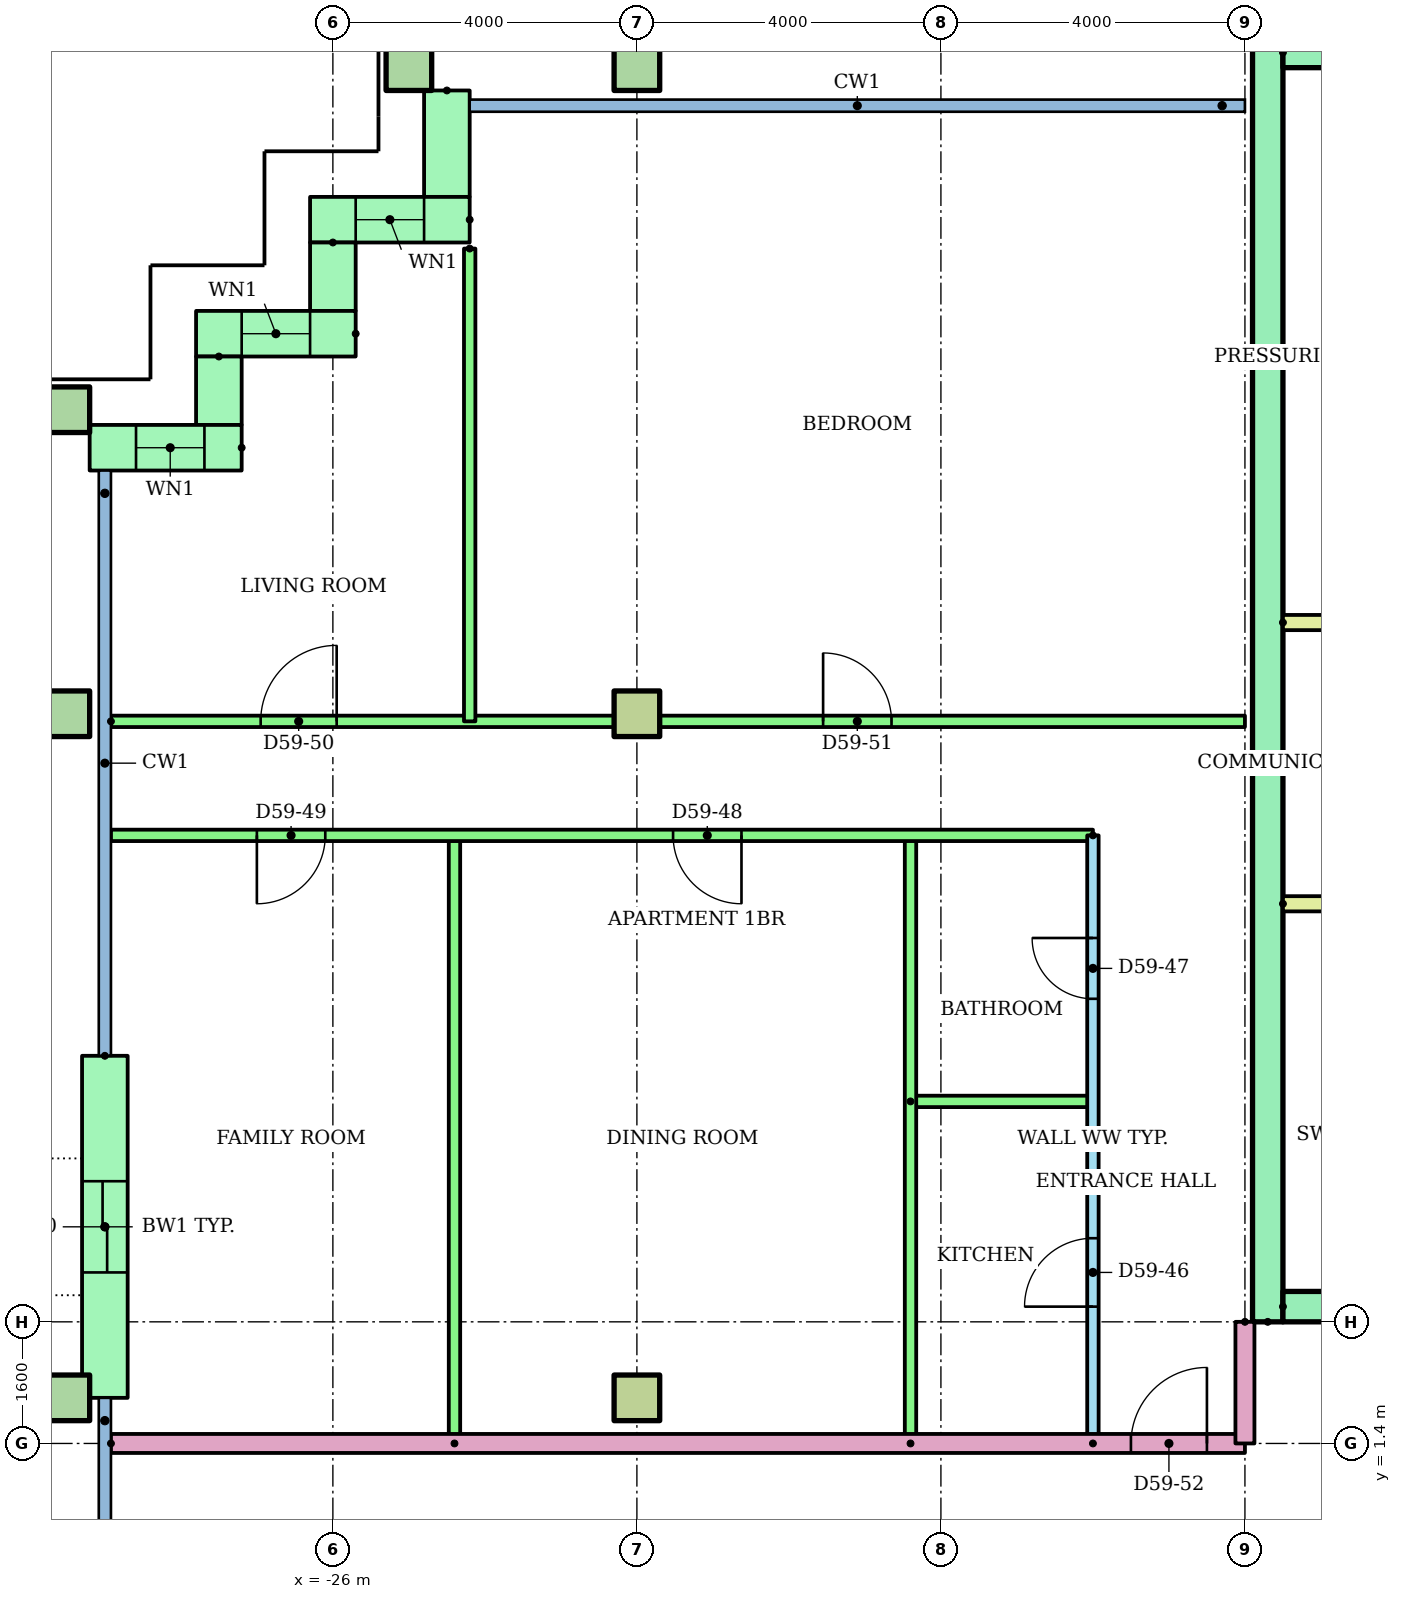
"""IFC4 building model, lengths in metres.
Left out: names, types, materials, properties, quantities, classifications, styles, units other than length and angle.
Written with IfcOpenShell. Run it as: python <this file> out.ifc"""

import sys

from ifc_helpers import new_model, si_unit, direction, frame, frame_2d, origin, origin_2d, place, context, subcontext, project, spatial, rectangle, hollow_rectangle, extrude, element, fill, save


model = new_model("IFC4")
c1 = context("Model", 3, precision=1e-05, world=origin(), true_north=direction((0.0, 1.0)))
c2 = subcontext(c1, "Body", "Model", "MODEL_VIEW")
j1 = project(units=[si_unit("LENGTHUNIT", "METRE"), si_unit("PLANEANGLEUNIT", "RADIAN")], contexts=[c1])
p1 = place(None, origin())
s1 = spatial("IfcSite", under=j1, at=p1, CompositionType="ELEMENT")
p2 = place(p1, origin())
s2 = spatial("IfcBuilding", under=s1, at=p2, CompositionType="ELEMENT")
p3 = place(p2, frame((0.0, 0.0, 226.8)))
s3 = spatial("IfcBuildingStorey", under=s2, at=p3, CompositionType="ELEMENT", Elevation=226.8)
p4 = place(p3, frame((-29.5, 2.0, 0.0)))
e1 = element("IfcColumn", 1, at=p4, inside=s3, PredefinedType="COLUMN", context=c2, shape_type="SweptSolid", body=[
    extrude(hollow_rectangle(XDim=0.6, YDim=0.6, WallThickness=0.03, at=origin_2d()), origin(), (0.0, 0.0, 1.0), 3.2),
])
p5 = place(p3, frame((-22.0, 2.0, 0.0)))
e2 = element("IfcColumn", 2, at=p5, inside=s3, PredefinedType="COLUMN", context=c2, shape_type="SweptSolid", body=[
    extrude(rectangle(XDim=0.6, YDim=0.6, at=origin_2d()), origin(), (0.0, 0.0, 1.0), 3.2),
])
p6 = place(p3, frame((-29.5, 11.0, 0.0)))
e3 = element("IfcColumn", 3, at=p6, inside=s3, PredefinedType="COLUMN", context=c2, shape_type="SweptSolid", body=[
    extrude(hollow_rectangle(XDim=0.6, YDim=0.6, WallThickness=0.03, at=origin_2d()), origin(), (0.0, 0.0, 1.0), 3.2),
])
p7 = place(p3, frame((-22.0, 11.0, 0.0)))
e4 = element("IfcColumn", 4, at=p7, inside=s3, PredefinedType="COLUMN", context=c2, shape_type="SweptSolid", body=[
    extrude(rectangle(XDim=0.6, YDim=0.6, at=origin_2d()), origin(), (0.0, 0.0, 1.0), 3.2),
])
for number, where in (
    (5, (-29.5, 15.0, 0.0)),
    (6, (-25.0, 19.5, 0.0)),
    (7, (-22.0, 19.5, 0.0)),
):
    element("IfcColumn", number, at=place(p3, frame(where)), inside=s3, PredefinedType="COLUMN", context=c2, shape_type="SweptSolid", body=[
        extrude(hollow_rectangle(XDim=0.6, YDim=0.6, WallThickness=0.03, at=origin_2d()), origin(), (0.0, 0.0, 1.0), 3.2),
    ])
p8 = place(p3, frame((-24.5, 19.2, 0.0), z_axis=(0.0, 0.0, 1.0), x_axis=(0.0, -1.0, 0.0)))
e8 = element("IfcWall", 8, at=p8, inside=s3, PredefinedType="STANDARD", context=c2, shape_type="SweptSolid", body=[
    extrude(rectangle(XDim=1.4, YDim=0.6, at=frame_2d((0.7, 0.0))), origin(), (0.0, 0.0, 1.0), 2.92),
])
p9 = place(p3, frame((-24.2, 17.5, 0.0), z_axis=(0.0, 0.0, 1.0), x_axis=(-1.0, 0.0, 0.0)))
e9 = element("IfcWall", 9, at=p9, inside=s3, PredefinedType="STANDARD", context=c2, shape_type="SweptSolid", body=[
    extrude(rectangle(XDim=2.1, YDim=0.6, at=frame_2d((1.05, 0.0))), origin(), (0.0, 0.0, 1.0), 2.92),
])
p10 = place(p9, frame((0.6, 0.0, 0.9)))
e10 = element("IfcOpeningElement", 10, at=p10, cuts=e9, PredefinedType="OPENING", context=c2, shape_type="SweptSolid", body=[
    extrude(rectangle(XDim=0.9, YDim=1.5, at=frame_2d((0.45, 0.75))), frame((0.0, 0.31, 0.0), z_axis=(0.0, -1.0, 0.0), x_axis=(1.0, 0.0, 0.0)), (0.0, 0.0, 1.0), 0.62),
])
p11 = place(p3, frame((-26.0, 17.2, 0.0), z_axis=(0.0, 0.0, 1.0), x_axis=(0.0, -1.0, 0.0)))
e11 = element("IfcWall", 11, at=p11, inside=s3, PredefinedType="STANDARD", context=c2, shape_type="SweptSolid", body=[
    extrude(rectangle(XDim=0.9, YDim=0.6, at=frame_2d((0.45, 0.0))), origin(), (0.0, 0.0, 1.0), 2.92),
])
p12 = place(p3, frame((-25.7, 16.0, 0.0), z_axis=(0.0, 0.0, 1.0), x_axis=(-1.0, 0.0, 0.0)))
e12 = element("IfcWall", 12, at=p12, inside=s3, PredefinedType="STANDARD", context=c2, shape_type="SweptSolid", body=[
    extrude(rectangle(XDim=2.1, YDim=0.6, at=frame_2d((1.05, 0.0))), origin(), (0.0, 0.0, 1.0), 2.92),
])
p13 = place(p12, frame((0.6, 0.0, 0.9)))
e13 = element("IfcOpeningElement", 13, at=p13, cuts=e12, PredefinedType="OPENING", context=c2, shape_type="SweptSolid", body=[
    extrude(rectangle(XDim=0.9, YDim=1.5, at=frame_2d((0.45, 0.75))), frame((0.0, 0.31, 0.0), z_axis=(0.0, -1.0, 0.0), x_axis=(1.0, 0.0, 0.0)), (0.0, 0.0, 1.0), 0.62),
])
p14 = place(p3, frame((-27.5, 15.7, 0.0), z_axis=(0.0, 0.0, 1.0), x_axis=(0.0, -1.0, 0.0)))
e14 = element("IfcWall", 14, at=p14, inside=s3, PredefinedType="STANDARD", context=c2, shape_type="SweptSolid", body=[
    extrude(rectangle(XDim=0.9, YDim=0.6, at=frame_2d((0.45, 0.0))), origin(), (0.0, 0.0, 1.0), 2.92),
])
p15 = place(p3, frame((-27.2, 14.5, 0.0), z_axis=(0.0, 0.0, 1.0), x_axis=(-1.0, 0.0, 0.0)))
e15 = element("IfcWall", 15, at=p15, inside=s3, PredefinedType="STANDARD", context=c2, shape_type="SweptSolid", body=[
    extrude(rectangle(XDim=2.0, YDim=0.6, at=frame_2d((1.0, 0.0))), origin(), (0.0, 0.0, 1.0), 2.92),
])
p16 = place(p15, frame((0.49, 0.0, 0.9)))
e16 = element("IfcOpeningElement", 16, at=p16, cuts=e15, PredefinedType="OPENING", context=c2, shape_type="SweptSolid", body=[
    extrude(rectangle(XDim=0.9, YDim=1.5, at=frame_2d((0.45, 0.75))), frame((0.0, 0.31, 0.0), z_axis=(0.0, -1.0, 0.0), x_axis=(1.0, 0.0, 0.0)), (0.0, 0.0, 1.0), 0.62),
])
p17 = place(p3, frame((-29.0, 6.5, 0.0), z_axis=(0.0, 0.0, 1.0), x_axis=(0.0, -1.0, 0.0)))
e17 = element("IfcWall", 17, at=p17, inside=s3, PredefinedType="STANDARD", context=c2, shape_type="SweptSolid", body=[
    extrude(rectangle(XDim=4.5, YDim=0.6, at=frame_2d((2.25, 0.0))), origin(), (0.0, 0.0, 1.0), 2.92),
])
p18 = place(p17, frame((1.65, 0.0, 0.0)))
e18 = element("IfcOpeningElement", 18, at=p18, cuts=e17, PredefinedType="OPENING", context=c2, shape_type="SweptSolid", body=[
    extrude(rectangle(XDim=1.2, YDim=2.1, at=frame_2d((0.6, 1.05))), frame((0.0, 0.31, 0.0), z_axis=(0.0, -1.0, 0.0), x_axis=(1.0, 0.0, 0.0)), (0.0, 0.0, 1.0), 0.62),
])
p19 = place(p3, frame((-13.7, 3.0, 0.0), z_axis=(0.0, 0.0, 1.0), x_axis=(0.0, 1.0, 0.0)))
e19 = element("IfcWall", 19, at=p19, inside=s3, PredefinedType="SHEAR", context=c2, shape_type="SweptSolid", body=[
    extrude(rectangle(XDim=17.0, YDim=0.4, at=frame_2d((8.5, 0.0))), origin(), (0.0, 0.0, 1.0), 2.92),
])
p20 = place(p3, frame((-13.5, 19.7, 0.0)))
e20 = element("IfcWall", 20, at=p20, inside=s3, PredefinedType="SHEAR", context=c2, shape_type="SweptSolid", body=[
    extrude(rectangle(XDim=27.0, YDim=0.4, at=frame_2d((13.5, 0.0))), origin(), (0.0, 0.0, 1.0), 2.92),
])
p21 = place(p3, frame((-13.5, 3.2, 0.0)))
e21 = element("IfcWall", 21, at=p21, inside=s3, PredefinedType="SHEAR", context=c2, shape_type="SweptSolid", body=[
    extrude(rectangle(XDim=27.0, YDim=0.4, at=frame_2d((13.5, 0.0))), origin(), (0.0, 0.0, 1.0), 2.92),
])
p22 = place(p21, frame((22.083, 0.0, 0.0)))
e22 = element("IfcOpeningElement", 22, at=p22, cuts=e21, PredefinedType="OPENING", context=c2, shape_type="SweptSolid", body=[
    extrude(rectangle(XDim=1.1, YDim=2.1, at=frame_2d((0.55, 1.05))), frame((0.0, 0.21, 0.0), z_axis=(0.0, -1.0, 0.0), x_axis=(1.0, 0.0, 0.0)), (0.0, 0.0, 1.0), 0.42),
])
p23 = place(p21, frame((25.128, 0.0, 0.0)))
e23 = element("IfcOpeningElement", 23, at=p23, cuts=e21, PredefinedType="OPENING", context=c2, shape_type="SweptSolid", body=[
    extrude(rectangle(XDim=1.1, YDim=2.1, at=frame_2d((0.55, 1.05))), frame((0.0, 0.21, 0.0), z_axis=(0.0, -1.0, 0.0), x_axis=(1.0, 0.0, 0.0)), (0.0, 0.0, 1.0), 0.42),
])
p24 = place(p21, frame((12.6, 0.0, 0.0)))
e24 = element("IfcOpeningElement", 24, at=p24, cuts=e21, PredefinedType="OPENING", context=c2, shape_type="SweptSolid", body=[
    extrude(rectangle(XDim=1.8, YDim=2.1, at=frame_2d((0.9, 1.05))), frame((0.0, 0.21, 0.0), z_axis=(0.0, -1.0, 0.0), x_axis=(1.0, 0.0, 0.0)), (0.0, 0.0, 1.0), 0.42),
])
for number, where in (
    (25, (-13.5, 8.5, 0.0)),
    (26, (-13.5, 12.2, 0.0)),
):
    element("IfcWall", number, at=place(p3, frame(where)), inside=s3, PredefinedType="PARTITIONING", context=c2, shape_type="SweptSolid", body=[
        extrude(rectangle(XDim=3.9, YDim=0.2, at=frame_2d((1.95, 0.0))), origin(), (0.0, 0.0, 1.0), 2.92),
    ])
p25 = place(p3, frame((-16.0, 1.4, 0.0), z_axis=(0.0, 0.0, 1.0), x_axis=(0.0, 1.0, 0.0)))
e27 = element("IfcWall", 27, at=p25, inside=s3, PredefinedType="PARTITIONING", context=c2, shape_type="SweptSolid", body=[
    extrude(rectangle(XDim=8.0, YDim=0.15, at=frame_2d((4.0, 0.0))), origin(), (0.0, 0.0, 1.0), 2.4),
])
p26 = place(p25, frame((1.8, 0.0, 0.0)))
e28 = element("IfcOpeningElement", 28, at=p26, cuts=e27, PredefinedType="OPENING", context=c2, shape_type="SweptSolid", body=[
    extrude(rectangle(XDim=0.9, YDim=2.1, at=frame_2d((0.45, 1.05))), frame((0.0, 0.085, 0.0), z_axis=(0.0, -1.0, 0.0), x_axis=(1.0, 0.0, 0.0)), (0.0, 0.0, 1.0), 0.17),
])
p27 = place(p25, frame((5.85, 0.0, 0.0)))
e29 = element("IfcOpeningElement", 29, at=p27, cuts=e27, PredefinedType="OPENING", context=c2, shape_type="SweptSolid", body=[
    extrude(rectangle(XDim=0.8, YDim=2.1, at=frame_2d((0.4, 1.05))), frame((0.0, 0.085, 0.0), z_axis=(0.0, -1.0, 0.0), x_axis=(1.0, 0.0, 0.0)), (0.0, 0.0, 1.0), 0.17),
])
p28 = place(p3, frame((-18.4, 5.9, 0.0)))
e30 = element("IfcWall", 30, at=p28, inside=s3, PredefinedType="PARTITIONING", context=c2, shape_type="SweptSolid", body=[
    extrude(rectangle(XDim=2.4, YDim=0.15, at=frame_2d((1.2, 0.0))), origin(), (0.0, 0.0, 1.0), 2.4),
])
for number, where, z_axis, x_axis in (
    (31, (-18.4, 1.4, 0.0), (0.0, 0.0, 1.0), (0.0, 1.0, 0.0)),
    (32, (-24.4, 1.4, 0.0), (0.0, 0.0, 1.0), (0.0, 1.0, 0.0)),
):
    element("IfcWall", number, at=place(p3, frame(where, z_axis=z_axis, x_axis=x_axis)), inside=s3, PredefinedType="PARTITIONING", context=c2, shape_type="SweptSolid", body=[
        extrude(rectangle(XDim=8.0, YDim=0.15, at=frame_2d((4.0, 0.0))), origin(), (0.0, 0.0, 1.0), 2.4),
    ])
p29 = place(p3, frame((-16.0, 9.4, 0.0), z_axis=(0.0, 0.0, 1.0), x_axis=(-1.0, 0.0, 0.0)))
e33 = element("IfcWall", 33, at=p29, inside=s3, PredefinedType="PARTITIONING", context=c2, shape_type="SweptSolid", body=[
    extrude(rectangle(XDim=12.92, YDim=0.15, at=frame_2d((6.46, 0.0))), origin(), (0.0, 0.0, 1.0), 2.4),
])
p30 = place(p29, frame((4.624, 0.0, 0.0)))
e34 = element("IfcOpeningElement", 34, at=p30, cuts=e33, PredefinedType="OPENING", context=c2, shape_type="SweptSolid", body=[
    extrude(rectangle(XDim=0.9, YDim=2.1, at=frame_2d((0.45, 1.05))), frame((0.0, 0.085, 0.0), z_axis=(0.0, -1.0, 0.0), x_axis=(1.0, 0.0, 0.0)), (0.0, 0.0, 1.0), 0.17),
])
p31 = place(p29, frame((10.1, 0.0, 0.0)))
e35 = element("IfcOpeningElement", 35, at=p31, cuts=e33, PredefinedType="OPENING", context=c2, shape_type="SweptSolid", body=[
    extrude(rectangle(XDim=0.9, YDim=2.1, at=frame_2d((0.45, 1.05))), frame((0.0, 0.085, 0.0), z_axis=(0.0, -1.0, 0.0), x_axis=(1.0, 0.0, 0.0)), (0.0, 0.0, 1.0), 0.17),
])
p32 = place(p3, frame((-28.92, 10.9, 0.0)))
e36 = element("IfcWall", 36, at=p32, inside=s3, PredefinedType="PARTITIONING", context=c2, shape_type="SweptSolid", body=[
    extrude(rectangle(XDim=14.92, YDim=0.15, at=frame_2d((7.46, 0.0))), origin(), (0.0, 0.0, 1.0), 2.4),
])
p33 = place(p32, frame((1.97, 0.0, 0.0)))
e37 = element("IfcOpeningElement", 37, at=p33, cuts=e36, PredefinedType="OPENING", context=c2, shape_type="SweptSolid", body=[
    extrude(rectangle(XDim=1.0, YDim=2.1, at=frame_2d((0.5, 1.05))), frame((0.0, 0.085, 0.0), z_axis=(0.0, -1.0, 0.0), x_axis=(1.0, 0.0, 0.0)), (0.0, 0.0, 1.0), 0.17),
])
p34 = place(p32, frame((9.37, 0.0, 0.0)))
e38 = element("IfcOpeningElement", 38, at=p34, cuts=e36, PredefinedType="OPENING", context=c2, shape_type="SweptSolid", body=[
    extrude(rectangle(XDim=0.9, YDim=2.1, at=frame_2d((0.45, 1.05))), frame((0.0, 0.085, 0.0), z_axis=(0.0, -1.0, 0.0), x_axis=(1.0, 0.0, 0.0)), (0.0, 0.0, 1.0), 0.17),
])
p35 = place(p3, frame((-24.2, 17.12, 0.0), z_axis=(0.0, 0.0, 1.0), x_axis=(0.0, -1.0, 0.0)))
e39 = element("IfcWall", 39, at=p35, inside=s3, PredefinedType="PARTITIONING", context=c2, shape_type="SweptSolid", body=[
    extrude(rectangle(XDim=6.22, YDim=0.15, at=frame_2d((3.11, 0.0))), origin(), (0.0, 0.0, 1.0), 2.4),
])
p36 = place(p3, frame((-28.92, 1.4, 0.0)))
e40 = element("IfcWall", 40, at=p36, inside=s3, PredefinedType="PARTITIONING", context=c2, shape_type="SweptSolid", body=[
    extrude(rectangle(XDim=14.92, YDim=0.25, at=frame_2d((7.46, 0.0))), origin(), (0.0, 0.0, 1.0), 2.4),
])
p37 = place(p36, frame((13.42, 0.0, 0.0)))
e41 = element("IfcOpeningElement", 41, at=p37, cuts=e40, PredefinedType="OPENING", context=c2, shape_type="SweptSolid", body=[
    extrude(rectangle(XDim=1.0, YDim=2.1, at=frame_2d((0.5, 1.05))), frame((0.0, 0.135, 0.0), z_axis=(0.0, -1.0, 0.0), x_axis=(1.0, 0.0, 0.0)), (0.0, 0.0, 1.0), 0.27),
])
p38 = place(p3, frame((-14.0, 3.0, 0.0), z_axis=(0.0, 0.0, 1.0), x_axis=(0.0, -1.0, 0.0)))
e42 = element("IfcWall", 42, at=p38, inside=s3, PredefinedType="PARTITIONING", context=c2, shape_type="SweptSolid", body=[
    extrude(rectangle(XDim=1.6, YDim=0.25, at=frame_2d((0.8, 0.0))), origin(), (0.0, 0.0, 1.0), 2.4),
])
p39 = place(p10, origin())
e43 = element("IfcWindow", 43, at=p39, inside=s3, PartitioningType="SINGLE_PANEL", PredefinedType="WINDOW", context=c2, shape_type="SweptSolid", body=[
    extrude(rectangle(XDim=0.9, YDim=1.5, at=frame_2d((0.45, 0.75))), frame((0.0, 0.03, 0.0), z_axis=(0.0, -1.0, 0.0), x_axis=(1.0, 0.0, 0.0)), (0.0, 0.0, 1.0), 0.06),
])
fill(e10, e43)
p40 = place(p13, origin())
e44 = element("IfcWindow", 44, at=p40, inside=s3, PartitioningType="SINGLE_PANEL", PredefinedType="WINDOW", context=c2, shape_type="SweptSolid", body=[
    extrude(rectangle(XDim=0.9, YDim=1.5, at=frame_2d((0.45, 0.75))), frame((0.0, 0.03, 0.0), z_axis=(0.0, -1.0, 0.0), x_axis=(1.0, 0.0, 0.0)), (0.0, 0.0, 1.0), 0.06),
])
fill(e13, e44)
p41 = place(p16, origin())
e45 = element("IfcWindow", 45, at=p41, inside=s3, PartitioningType="SINGLE_PANEL", PredefinedType="WINDOW", context=c2, shape_type="SweptSolid", body=[
    extrude(rectangle(XDim=0.9, YDim=1.5, at=frame_2d((0.45, 0.75))), frame((0.0, 0.03, 0.0), z_axis=(0.0, -1.0, 0.0), x_axis=(1.0, 0.0, 0.0)), (0.0, 0.0, 1.0), 0.06),
])
fill(e16, e45)
p42 = place(p26, origin())
e46 = element("IfcDoor", 46, at=p42, inside=s3, OperationType="SINGLE_SWING_LEFT", PredefinedType="DOOR", context=c2, shape_type="SweptSolid", body=[
    extrude(rectangle(XDim=0.9, YDim=2.1, at=frame_2d((0.45, 1.05))), frame((0.0, 0.025, 0.0), z_axis=(0.0, -1.0, 0.0), x_axis=(1.0, 0.0, 0.0)), (0.0, 0.0, 1.0), 0.05),
])
fill(e28, e46)
p43 = place(p27, origin())
e47 = element("IfcDoor", 47, at=p43, inside=s3, OperationType="SINGLE_SWING_RIGHT", PredefinedType="DOOR", context=c2, shape_type="SweptSolid", body=[
    extrude(rectangle(XDim=0.8, YDim=2.1, at=frame_2d((0.4, 1.05))), frame((0.0, 0.025, 0.0), z_axis=(0.0, -1.0, 0.0), x_axis=(1.0, 0.0, 0.0)), (0.0, 0.0, 1.0), 0.05),
])
fill(e29, e47)
p44 = place(p30, origin())
e48 = element("IfcDoor", 48, at=p44, inside=s3, OperationType="SINGLE_SWING_LEFT", PredefinedType="DOOR", context=c2, shape_type="SweptSolid", body=[
    extrude(rectangle(XDim=0.9, YDim=2.1, at=frame_2d((0.45, 1.05))), frame((0.0, 0.025, 0.0), z_axis=(0.0, -1.0, 0.0), x_axis=(1.0, 0.0, 0.0)), (0.0, 0.0, 1.0), 0.05),
])
fill(e34, e48)
p45 = place(p31, origin())
e49 = element("IfcDoor", 49, at=p45, inside=s3, OperationType="SINGLE_SWING_RIGHT", PredefinedType="DOOR", context=c2, shape_type="SweptSolid", body=[
    extrude(rectangle(XDim=0.9, YDim=2.1, at=frame_2d((0.45, 1.05))), frame((0.0, 0.025, 0.0), z_axis=(0.0, -1.0, 0.0), x_axis=(1.0, 0.0, 0.0)), (0.0, 0.0, 1.0), 0.05),
])
fill(e35, e49)
p46 = place(p33, origin())
e50 = element("IfcDoor", 50, at=p46, inside=s3, OperationType="SINGLE_SWING_RIGHT", PredefinedType="DOOR", context=c2, shape_type="SweptSolid", body=[
    extrude(rectangle(XDim=1.0, YDim=2.1, at=frame_2d((0.5, 1.05))), frame((0.0, 0.025, 0.0), z_axis=(0.0, -1.0, 0.0), x_axis=(1.0, 0.0, 0.0)), (0.0, 0.0, 1.0), 0.05),
])
fill(e37, e50)
p47 = place(p34, origin())
e51 = element("IfcDoor", 51, at=p47, inside=s3, OperationType="SINGLE_SWING_LEFT", PredefinedType="DOOR", context=c2, shape_type="SweptSolid", body=[
    extrude(rectangle(XDim=0.9, YDim=2.1, at=frame_2d((0.45, 1.05))), frame((0.0, 0.025, 0.0), z_axis=(0.0, -1.0, 0.0), x_axis=(1.0, 0.0, 0.0)), (0.0, 0.0, 1.0), 0.05),
])
fill(e38, e51)
p48 = place(p37, origin())
e52 = element("IfcDoor", 52, at=p48, inside=s3, OperationType="SINGLE_SWING_RIGHT", PredefinedType="DOOR", context=c2, shape_type="SweptSolid", body=[
    extrude(rectangle(XDim=1.0, YDim=2.1, at=frame_2d((0.5, 1.05))), frame((0.0, 0.025, 0.0), z_axis=(0.0, -1.0, 0.0), x_axis=(1.0, 0.0, 0.0)), (0.0, 0.0, 1.0), 0.05),
])
fill(e41, e52)
p49 = place(p18, origin())
e53 = element("IfcDoor", 53, at=p49, inside=s3, OperationType="SLIDING_TO_LEFT", PredefinedType="DOOR", context=c2, shape_type="SweptSolid", body=[
    extrude(rectangle(XDim=1.2, YDim=2.1, at=frame_2d((0.6, 1.05))), frame((0.0, 0.025, 0.0), z_axis=(0.0, -1.0, 0.0), x_axis=(1.0, 0.0, 0.0)), (0.0, 0.0, 1.0), 0.05),
])
fill(e18, e53)
save(model, sys.argv[1])
